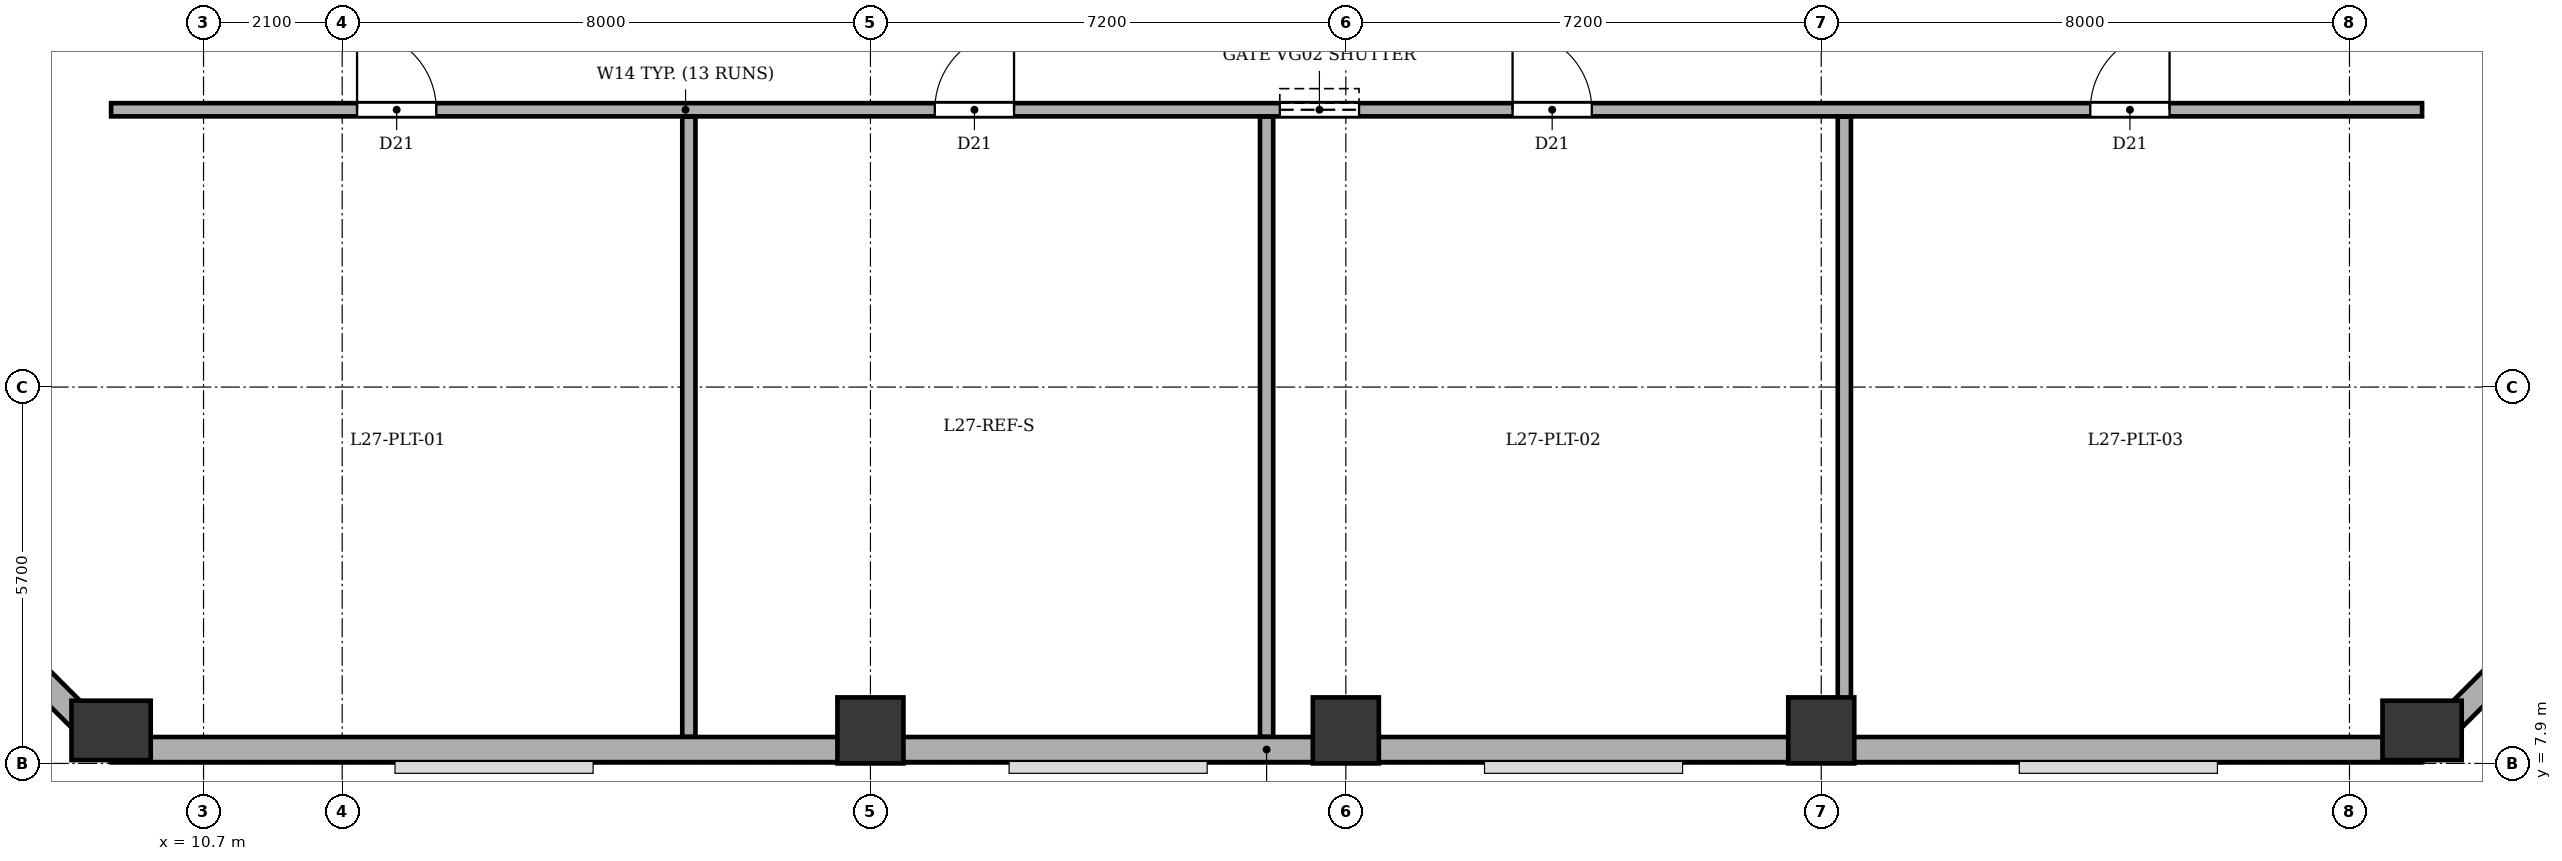
"""IFC4 building model, lengths in metres.
Left out: names, types, materials, properties, quantities, classifications, styles, units other than length and angle.
Written with IfcOpenShell. Run it as: python <this file> out.ifc"""

import sys

from ifc_helpers import new_model, si_unit, direction, frame, frame_2d, origin, origin_2d, place, context, subcontext, project, spatial, rectangle, extrude, element, fill, save


model = new_model("IFC4")
c1 = context("Model", 3, precision=1e-05, world=origin(), true_north=direction((0.0, 1.0)))
c2 = subcontext(c1, "Body", "Model", "MODEL_VIEW")
j1 = project(units=[si_unit("LENGTHUNIT", "METRE"), si_unit("PLANEANGLEUNIT", "RADIAN")], contexts=[c1])
p1 = place(None, origin())
s1 = spatial("IfcSite", under=j1, at=p1, CompositionType="ELEMENT")
p2 = place(p1, origin())
s2 = spatial("IfcBuilding", under=s1, at=p2, CompositionType="ELEMENT")
p3 = place(p2, frame((0.0, 0.0, 110.1)))
s3 = spatial("IfcBuildingStorey", under=s2, at=p3, CompositionType="ELEMENT", Elevation=110.1)
p4 = place(p3, frame((9.3, 8.4, 0.0), z_axis=(0.0, 0.0, 1.0), x_axis=(1.0, 0.0, 0.0)))
e1 = element("IfcColumn", 1, at=p4, inside=s3, PredefinedType="COLUMN", context=c2, shape_type="SweptSolid", body=[
    extrude(rectangle(XDim=0.9, YDim=1.2, at=origin_2d()), origin(), (0.0, 0.0, 1.0), 5.4),
])
for number, where, z_axis, x_axis in (
    (2, (20.8, 8.4, 0.0), (0.0, 0.0, 1.0), (1.0, 0.0, 0.0)),
    (3, (28.0, 8.4, 0.0), (0.0, 0.0, 1.0), (1.0, 0.0, 0.0)),
    (4, (35.2, 8.4, 0.0), (0.0, 0.0, 1.0), (1.0, 0.0, 0.0)),
):
    element("IfcColumn", number, at=place(p3, frame(where, z_axis=z_axis, x_axis=x_axis)), inside=s3, PredefinedType="COLUMN", context=c2, shape_type="SweptSolid", body=[
        extrude(rectangle(XDim=1.0, YDim=1.0, at=origin_2d()), origin(), (0.0, 0.0, 1.0), 5.4),
    ])
p5 = place(p3, frame((44.3, 8.4, 0.0), z_axis=(0.0, 0.0, 1.0), x_axis=(1.0, 0.0, 0.0)))
e5 = element("IfcColumn", 5, at=p5, inside=s3, PredefinedType="COLUMN", context=c2, shape_type="SweptSolid", body=[
    extrude(rectangle(XDim=0.9, YDim=1.2, at=origin_2d()), origin(), (0.0, 0.0, 1.0), 5.4),
])
p6 = place(p3, frame((44.3, 8.11, 0.0), z_axis=(0.0, 0.0, 1.0), x_axis=(-1.0, 0.0, 0.0)))
e6 = element("IfcWall", 6, at=p6, inside=s3, PredefinedType="STANDARD", context=c2, shape_type="SweptSolid", body=[
    extrude(rectangle(XDim=35.0, YDim=0.38, at=frame_2d((17.5, 0.0))), origin(), (0.0, 0.0, 1.0), 4.575),
])
for number, where, z_axis, x_axis in (
    (7, (9.3, 8.11, 0.0), (0.0, 0.0, 1.0), (-0.707, 0.707, 0.0)),
    (8, (49.09, 12.9, 0.0), (0.0, 0.0, 1.0), (-0.707, -0.707, 0.0)),
):
    element("IfcWall", number, at=place(p3, frame(where, z_axis=z_axis, x_axis=x_axis)), inside=s3, PredefinedType="STANDARD", context=c2, shape_type="SweptSolid", body=[
        extrude(rectangle(XDim=6.774, YDim=0.38, at=frame_2d((3.387, 0.0))), origin(), (0.0, 0.0, 1.0), 4.575),
    ])
p7 = place(p3, frame((9.3, 17.8, 0.0), z_axis=(0.0, 0.0, 1.0), x_axis=(1.0, 0.0, 0.0)))
e9 = element("IfcWall", 9, at=p7, inside=s3, PredefinedType="SOLIDWALL", context=c2, shape_type="SweptSolid", body=[
    extrude(rectangle(XDim=35.0, YDim=0.2, at=frame_2d((17.5, 0.0))), origin(), (0.0, 0.0, 1.0), 5.04),
])
p8 = place(p7, frame((3.725, 0.0, 0.0)))
e10 = element("IfcOpeningElement", 10, at=p8, cuts=e9, PredefinedType="OPENING", context=c2, shape_type="SweptSolid", body=[
    extrude(rectangle(XDim=1.2, YDim=2.15, at=frame_2d((0.6, 1.075))), frame((0.0, 0.11, 0.0), z_axis=(0.0, -1.0, 0.0), x_axis=(1.0, 0.0, 0.0)), (0.0, 0.0, 1.0), 0.22),
])
p9 = place(p7, frame((12.475, 0.0, 0.0)))
e11 = element("IfcOpeningElement", 11, at=p9, cuts=e9, PredefinedType="OPENING", context=c2, shape_type="SweptSolid", body=[
    extrude(rectangle(XDim=1.2, YDim=2.15, at=frame_2d((0.6, 1.075))), frame((0.0, 0.11, 0.0), z_axis=(0.0, -1.0, 0.0), x_axis=(1.0, 0.0, 0.0)), (0.0, 0.0, 1.0), 0.22),
])
p10 = place(p7, frame((21.225, 0.0, 0.0)))
e12 = element("IfcOpeningElement", 12, at=p10, cuts=e9, PredefinedType="OPENING", context=c2, shape_type="SweptSolid", body=[
    extrude(rectangle(XDim=1.2, YDim=2.15, at=frame_2d((0.6, 1.075))), frame((0.0, 0.11, 0.0), z_axis=(0.0, -1.0, 0.0), x_axis=(1.0, 0.0, 0.0)), (0.0, 0.0, 1.0), 0.22),
])
p11 = place(p7, frame((29.975, 0.0, 0.0)))
e13 = element("IfcOpeningElement", 13, at=p11, cuts=e9, PredefinedType="OPENING", context=c2, shape_type="SweptSolid", body=[
    extrude(rectangle(XDim=1.2, YDim=2.15, at=frame_2d((0.6, 1.075))), frame((0.0, 0.11, 0.0), z_axis=(0.0, -1.0, 0.0), x_axis=(1.0, 0.0, 0.0)), (0.0, 0.0, 1.0), 0.22),
])
p12 = place(p7, frame((17.7, 0.0, 0.0)))
e14 = element("IfcOpeningElement", 14, at=p12, cuts=e9, PredefinedType="OPENING", context=c2, shape_type="SweptSolid", body=[
    extrude(rectangle(XDim=1.2, YDim=2.15, at=frame_2d((0.6, 1.075))), frame((0.0, 0.11, 0.0), z_axis=(0.0, -1.0, 0.0), x_axis=(1.0, 0.0, 0.0)), (0.0, 0.0, 1.0), 0.22),
])
for number, where, z_axis, x_axis in (
    (15, (18.05, 8.305, 0.0), (0.0, 0.0, 1.0), (0.0, 1.0, 0.0)),
    (16, (26.8, 8.305, 0.0), (0.0, 0.0, 1.0), (0.0, 1.0, 0.0)),
):
    element("IfcWall", number, at=place(p3, frame(where, z_axis=z_axis, x_axis=x_axis)), inside=s3, PredefinedType="SOLIDWALL", context=c2, shape_type="SweptSolid", body=[
        extrude(rectangle(XDim=9.39, YDim=0.2, at=frame_2d((4.695, 0.0))), origin(), (0.0, 0.0, 1.0), 5.04),
    ])
p13 = place(p3, frame((35.55, 8.305, 0.0), z_axis=(0.0, 0.0, 1.0), x_axis=(0.0, 1.0, 0.0)))
e17 = element("IfcWall", 17, at=p13, inside=s3, PredefinedType="SOLIDWALL", context=c2, shape_type="SweptSolid", body=[
    extrude(rectangle(XDim=9.39, YDim=0.2, at=frame_2d((4.695, 0.0))), origin(), (0.0, 0.0, 1.0), 4.275),
])
p14 = place(p8, origin())
e18 = element("IfcDoor", 18, at=p14, inside=s3, OperationType="SINGLE_SWING_LEFT", PredefinedType="DOOR", context=c2, shape_type="SweptSolid", body=[
    extrude(rectangle(XDim=1.2, YDim=2.15, at=frame_2d((0.6, 1.075))), frame((0.0, 0.025, 0.0), z_axis=(0.0, -1.0, 0.0), x_axis=(1.0, 0.0, 0.0)), (0.0, 0.0, 1.0), 0.05),
])
fill(e10, e18)
p15 = place(p9, origin())
e19 = element("IfcDoor", 19, at=p15, inside=s3, OperationType="SINGLE_SWING_RIGHT", PredefinedType="DOOR", context=c2, shape_type="SweptSolid", body=[
    extrude(rectangle(XDim=1.2, YDim=2.15, at=frame_2d((0.6, 1.075))), frame((0.0, 0.025, 0.0), z_axis=(0.0, -1.0, 0.0), x_axis=(1.0, 0.0, 0.0)), (0.0, 0.0, 1.0), 0.05),
])
fill(e11, e19)
p16 = place(p10, origin())
e20 = element("IfcDoor", 20, at=p16, inside=s3, OperationType="SINGLE_SWING_LEFT", PredefinedType="DOOR", context=c2, shape_type="SweptSolid", body=[
    extrude(rectangle(XDim=1.2, YDim=2.15, at=frame_2d((0.6, 1.075))), frame((0.0, 0.025, 0.0), z_axis=(0.0, -1.0, 0.0), x_axis=(1.0, 0.0, 0.0)), (0.0, 0.0, 1.0), 0.05),
])
fill(e12, e20)
p17 = place(p11, origin())
e21 = element("IfcDoor", 21, at=p17, inside=s3, OperationType="SINGLE_SWING_RIGHT", PredefinedType="DOOR", context=c2, shape_type="SweptSolid", body=[
    extrude(rectangle(XDim=1.2, YDim=2.15, at=frame_2d((0.6, 1.075))), frame((0.0, 0.025, 0.0), z_axis=(0.0, -1.0, 0.0), x_axis=(1.0, 0.0, 0.0)), (0.0, 0.0, 1.0), 0.05),
])
fill(e13, e21)
p18 = place(p12, origin())
e22 = element("IfcDoor", 22, at=p18, inside=s3, OperationType="SINGLE_SWING_LEFT", PredefinedType="GATE", context=c2, shape_type="SweptSolid", body=[
    extrude(rectangle(XDim=1.2, YDim=2.15, at=frame_2d((0.6, 1.075))), frame((0.0, 0.025, 0.0), z_axis=(0.0, -1.0, 0.0), x_axis=(1.0, 0.0, 0.0)), (0.0, 0.0, 1.0), 0.05),
])
fill(e14, e22)
save(model, sys.argv[1])
